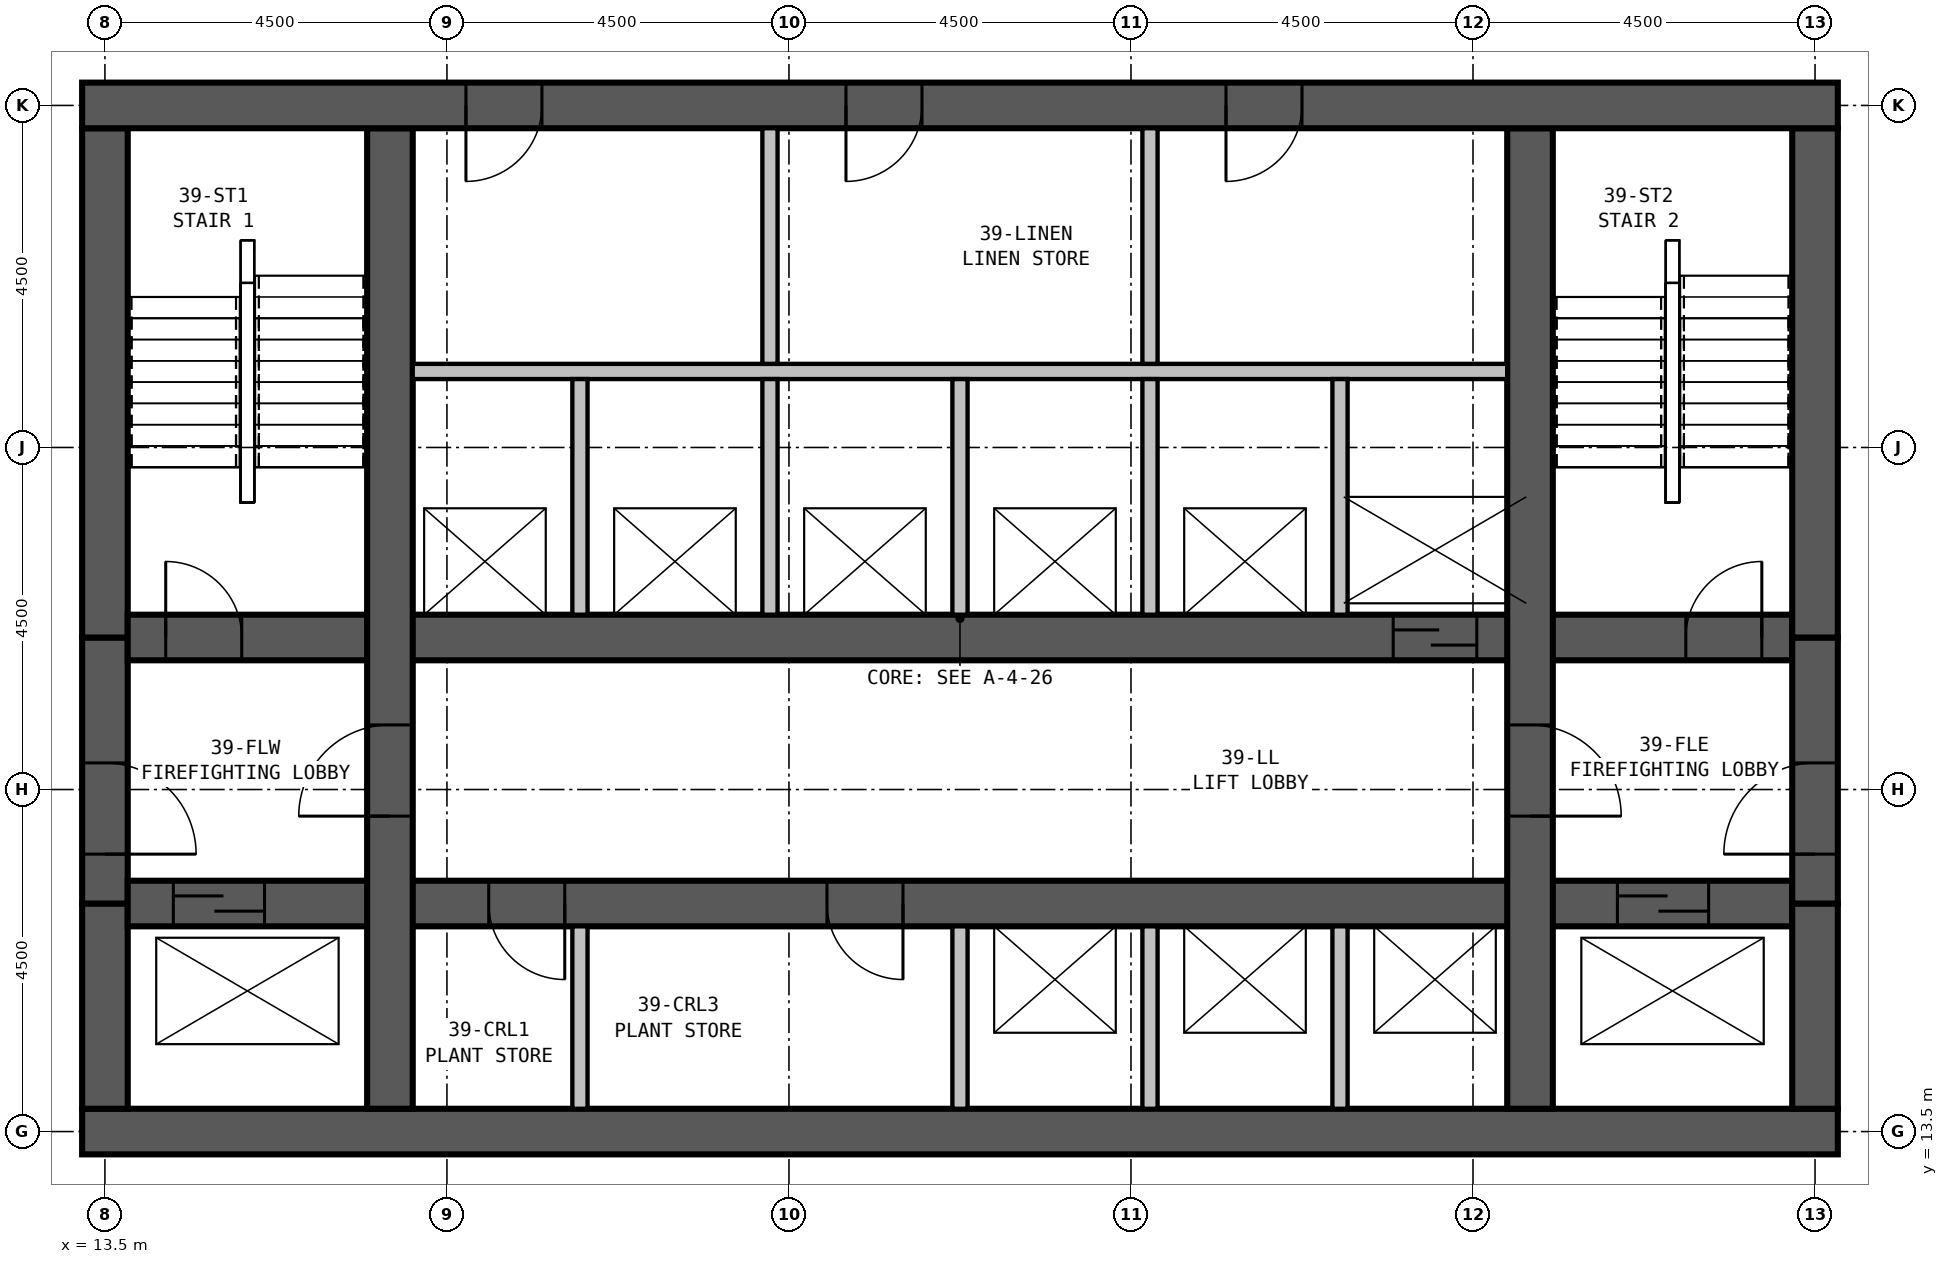
"""IFC4 building model, lengths in metres.
Left out: names, types, materials, properties, quantities, classifications, styles, units other than length and angle.
Written with IfcOpenShell. Run it as: python <this file> out.ifc"""

import sys

from ifc_helpers import new_model, si_unit, direction, frame, frame_2d, origin, place, context, subcontext, project, spatial, rectangle, extrude, element, fill, save


model = new_model("IFC4")
c1 = context("Model", 3, precision=1e-05, world=origin(), true_north=direction((0.0, 1.0)))
c2 = subcontext(c1, "Body", "Model", "MODEL_VIEW")
j1 = project(units=[si_unit("LENGTHUNIT", "METRE"), si_unit("PLANEANGLEUNIT", "RADIAN")], contexts=[c1])
p1 = place(None, origin())
s1 = spatial("IfcSite", under=j1, at=p1, CompositionType="ELEMENT")
p2 = place(p1, origin())
s2 = spatial("IfcBuilding", under=s1, at=p2, CompositionType="ELEMENT")
p3 = place(p2, frame((0.0, 0.0, 151.9)))
s3 = spatial("IfcBuildingStorey", under=s2, at=p3, CompositionType="ELEMENT", Elevation=151.9)
p4 = place(p3, frame((13.2, 13.5, 0.0), z_axis=(0.0, 0.0, 1.0), x_axis=(1.0, 0.0, 0.0)))
e1 = element("IfcWall", 1, at=p4, inside=s3, PredefinedType="SHEAR", context=c2, shape_type="SweptSolid", body=[
    extrude(rectangle(XDim=23.1, YDim=0.6, at=frame_2d((11.55, 0.0))), origin(), (0.0, 0.0, 1.0), 6.0),
])
p5 = place(p3, frame((36.3, 27.0, 0.0), z_axis=(0.0, 0.0, 1.0), x_axis=(-1.0, 0.0, 0.0)))
e2 = element("IfcWall", 2, at=p5, inside=s3, PredefinedType="SHEAR", context=c2, shape_type="SweptSolid", body=[
    extrude(rectangle(XDim=23.1, YDim=0.6, at=frame_2d((11.55, 0.0))), origin(), (0.0, 0.0, 1.0), 6.0),
])
p6 = place(p5, frame((17.05, 0.0, 0.0)))
e3 = element("IfcOpeningElement", 3, at=p6, cuts=e2, PredefinedType="OPENING", context=c2, shape_type="SweptSolid", body=[
    extrude(rectangle(XDim=1.0, YDim=2.1, at=frame_2d((0.5, 1.05))), frame((0.0, 0.31, 0.0), z_axis=(0.0, -1.0, 0.0), x_axis=(1.0, 0.0, 0.0)), (0.0, 0.0, 1.0), 0.62),
])
p7 = place(p5, frame((12.05, 0.0, 0.0)))
e4 = element("IfcOpeningElement", 4, at=p7, cuts=e2, PredefinedType="OPENING", context=c2, shape_type="SweptSolid", body=[
    extrude(rectangle(XDim=1.0, YDim=2.1, at=frame_2d((0.5, 1.05))), frame((0.0, 0.31, 0.0), z_axis=(0.0, -1.0, 0.0), x_axis=(1.0, 0.0, 0.0)), (0.0, 0.0, 1.0), 0.62),
])
p8 = place(p5, frame((7.05, 0.0, 0.0)))
e5 = element("IfcOpeningElement", 5, at=p8, cuts=e2, PredefinedType="OPENING", context=c2, shape_type="SweptSolid", body=[
    extrude(rectangle(XDim=1.0, YDim=2.1, at=frame_2d((0.5, 1.05))), frame((0.0, 0.31, 0.0), z_axis=(0.0, -1.0, 0.0), x_axis=(1.0, 0.0, 0.0)), (0.0, 0.0, 1.0), 0.62),
])
p9 = place(p3, frame((17.25, 13.8, 0.0), z_axis=(0.0, 0.0, 1.0), x_axis=(0.0, 1.0, 0.0)))
e6 = element("IfcWall", 6, at=p9, inside=s3, PredefinedType="SHEAR", context=c2, shape_type="SweptSolid", body=[
    extrude(rectangle(XDim=12.9, YDim=0.6, at=frame_2d((6.45, 0.0))), origin(), (0.0, 0.0, 1.0), 6.0),
])
p10 = place(p9, frame((3.85, 0.0, 0.0)))
e7 = element("IfcOpeningElement", 7, at=p10, cuts=e6, PredefinedType="OPENING", context=c2, shape_type="SweptSolid", body=[
    extrude(rectangle(XDim=1.2, YDim=2.1, at=frame_2d((0.6, 1.05))), frame((0.0, 0.31, 0.0), z_axis=(0.0, -1.0, 0.0), x_axis=(1.0, 0.0, 0.0)), (0.0, 0.0, 1.0), 0.62),
])
p11 = place(p3, frame((32.25, 13.8, 0.0), z_axis=(0.0, 0.0, 1.0), x_axis=(0.0, 1.0, 0.0)))
e8 = element("IfcWall", 8, at=p11, inside=s3, PredefinedType="SHEAR", context=c2, shape_type="SweptSolid", body=[
    extrude(rectangle(XDim=12.9, YDim=0.6, at=frame_2d((6.45, 0.0))), origin(), (0.0, 0.0, 1.0), 6.0),
])
p12 = place(p11, frame((5.05, 0.0, 0.0), z_axis=(0.0, 0.0, 1.0), x_axis=(-1.0, 0.0, 0.0)))
e9 = element("IfcOpeningElement", 9, at=p12, cuts=e8, PredefinedType="OPENING", context=c2, shape_type="SweptSolid", body=[
    extrude(rectangle(XDim=1.2, YDim=2.1, at=frame_2d((0.6, 1.05))), frame((0.0, 0.31, 0.0), z_axis=(0.0, -1.0, 0.0), x_axis=(1.0, 0.0, 0.0)), (0.0, 0.0, 1.0), 0.62),
])
p13 = place(p3, frame((13.8, 16.5, 0.0), z_axis=(0.0, 0.0, 1.0), x_axis=(1.0, 0.0, 0.0)))
e10 = element("IfcWall", 10, at=p13, inside=s3, PredefinedType="SHEAR", context=c2, shape_type="SweptSolid", body=[
    extrude(rectangle(XDim=21.9, YDim=0.6, at=frame_2d((10.95, 0.0))), origin(), (0.0, 0.0, 1.0), 6.0),
])
p14 = place(p13, frame((5.75, 0.0, 0.0), z_axis=(0.0, 0.0, 1.0), x_axis=(-1.0, 0.0, 0.0)))
e11 = element("IfcOpeningElement", 11, at=p14, cuts=e10, PredefinedType="OPENING", context=c2, shape_type="SweptSolid", body=[
    extrude(rectangle(XDim=1.0, YDim=2.1, at=frame_2d((0.5, 1.05))), frame((0.0, 0.31, 0.0), z_axis=(0.0, -1.0, 0.0), x_axis=(1.0, 0.0, 0.0)), (0.0, 0.0, 1.0), 0.62),
])
p15 = place(p13, frame((10.2, 0.0, 0.0), z_axis=(0.0, 0.0, 1.0), x_axis=(-1.0, 0.0, 0.0)))
e12 = element("IfcOpeningElement", 12, at=p15, cuts=e10, PredefinedType="OPENING", context=c2, shape_type="SweptSolid", body=[
    extrude(rectangle(XDim=1.0, YDim=2.1, at=frame_2d((0.5, 1.05))), frame((0.0, 0.31, 0.0), z_axis=(0.0, -1.0, 0.0), x_axis=(1.0, 0.0, 0.0)), (0.0, 0.0, 1.0), 0.62),
])
p16 = place(p13, frame((0.6, 0.0, 0.0)))
e13 = element("IfcOpeningElement", 13, at=p16, cuts=e10, PredefinedType="OPENING", context=c2, shape_type="SweptSolid", body=[
    extrude(rectangle(XDim=1.2, YDim=2.1, at=frame_2d((0.6, 1.05))), frame((0.0, 0.31, 0.0), z_axis=(0.0, -1.0, 0.0), x_axis=(1.0, 0.0, 0.0)), (0.0, 0.0, 1.0), 0.62),
])
p17 = place(p13, frame((19.6, 0.0, 0.0)))
e14 = element("IfcOpeningElement", 14, at=p17, cuts=e10, PredefinedType="OPENING", context=c2, shape_type="SweptSolid", body=[
    extrude(rectangle(XDim=1.2, YDim=2.1, at=frame_2d((0.6, 1.05))), frame((0.0, 0.31, 0.0), z_axis=(0.0, -1.0, 0.0), x_axis=(1.0, 0.0, 0.0)), (0.0, 0.0, 1.0), 0.62),
])
p18 = place(p3, frame((13.8, 20.0, 0.0), z_axis=(0.0, 0.0, 1.0), x_axis=(1.0, 0.0, 0.0)))
e15 = element("IfcWall", 15, at=p18, inside=s3, PredefinedType="SHEAR", context=c2, shape_type="SweptSolid", body=[
    extrude(rectangle(XDim=21.9, YDim=0.6, at=frame_2d((10.95, 0.0))), origin(), (0.0, 0.0, 1.0), 6.0),
])
p19 = place(p18, frame((0.5, 0.0, 0.0)))
e16 = element("IfcOpeningElement", 16, at=p19, cuts=e15, PredefinedType="OPENING", context=c2, shape_type="SweptSolid", body=[
    extrude(rectangle(XDim=1.0, YDim=2.1, at=frame_2d((0.5, 1.05))), frame((0.0, 0.31, 0.0), z_axis=(0.0, -1.0, 0.0), x_axis=(1.0, 0.0, 0.0)), (0.0, 0.0, 1.0), 0.62),
])
p20 = place(p18, frame((20.5, 0.0, 0.0)))
e17 = element("IfcOpeningElement", 17, at=p20, cuts=e15, PredefinedType="OPENING", context=c2, shape_type="SweptSolid", body=[
    extrude(rectangle(XDim=1.0, YDim=2.1, at=frame_2d((0.5, 1.05))), frame((0.0, 0.31, 0.0), z_axis=(0.0, -1.0, 0.0), x_axis=(1.0, 0.0, 0.0)), (0.0, 0.0, 1.0), 0.62),
])
p21 = place(p18, frame((16.65, 0.0, 0.0)))
e18 = element("IfcOpeningElement", 18, at=p21, cuts=e15, PredefinedType="OPENING", context=c2, shape_type="SweptSolid", body=[
    extrude(rectangle(XDim=1.1, YDim=2.1, at=frame_2d((0.55, 1.05))), frame((0.0, 0.31, 0.0), z_axis=(0.0, -1.0, 0.0), x_axis=(1.0, 0.0, 0.0)), (0.0, 0.0, 1.0), 0.62),
])
p22 = place(p3, frame((13.5, 26.7, 0.0), z_axis=(0.0, 0.0, 1.0), x_axis=(0.0, -1.0, 0.0)))
e19 = element("IfcWall", 19, at=p22, inside=s3, PredefinedType="SHEAR", context=c2, shape_type="SweptSolid", body=[
    extrude(rectangle(XDim=6.7, YDim=0.6, at=frame_2d((3.35, 0.0))), origin(), (0.0, 0.0, 1.0), 6.0),
])
p23 = place(p3, frame((13.5, 20.0, 0.0), z_axis=(0.0, 0.0, 1.0), x_axis=(0.0, -1.0, 0.0)))
e20 = element("IfcWall", 20, at=p23, inside=s3, PredefinedType="SHEAR", context=c2, shape_type="SweptSolid", body=[
    extrude(rectangle(XDim=3.5, YDim=0.6, at=frame_2d((1.75, 0.0))), origin(), (0.0, 0.0, 1.0), 6.0),
])
p24 = place(p23, frame((1.65, 0.0, 0.0)))
e21 = element("IfcOpeningElement", 21, at=p24, cuts=e20, PredefinedType="OPENING", context=c2, shape_type="SweptSolid", body=[
    extrude(rectangle(XDim=1.2, YDim=2.1, at=frame_2d((0.6, 1.05))), frame((0.0, 0.31, 0.0), z_axis=(0.0, -1.0, 0.0), x_axis=(1.0, 0.0, 0.0)), (0.0, 0.0, 1.0), 0.62),
])
for number, where, z_axis, x_axis in (
    (22, (13.5, 16.5, 0.0), (0.0, 0.0, 1.0), (0.0, -1.0, 0.0)),
    (23, (36.0, 13.8, 0.0), (0.0, 0.0, 1.0), (0.0, 1.0, 0.0)),
):
    element("IfcWall", number, at=place(p3, frame(where, z_axis=z_axis, x_axis=x_axis)), inside=s3, PredefinedType="SHEAR", context=c2, shape_type="SweptSolid", body=[
        extrude(rectangle(XDim=2.7, YDim=0.6, at=frame_2d((1.35, 0.0))), origin(), (0.0, 0.0, 1.0), 6.0),
    ])
p25 = place(p3, frame((36.0, 16.5, 0.0), z_axis=(0.0, 0.0, 1.0), x_axis=(0.0, 1.0, 0.0)))
e24 = element("IfcWall", 24, at=p25, inside=s3, PredefinedType="SHEAR", context=c2, shape_type="SweptSolid", body=[
    extrude(rectangle(XDim=3.5, YDim=0.6, at=frame_2d((1.75, 0.0))), origin(), (0.0, 0.0, 1.0), 6.0),
])
p26 = place(p25, frame((0.65, 0.0, 0.0)))
e25 = element("IfcOpeningElement", 25, at=p26, cuts=e24, PredefinedType="OPENING", context=c2, shape_type="SweptSolid", body=[
    extrude(rectangle(XDim=1.2, YDim=2.1, at=frame_2d((0.6, 1.05))), frame((0.0, 0.31, 0.0), z_axis=(0.0, -1.0, 0.0), x_axis=(1.0, 0.0, 0.0)), (0.0, 0.0, 1.0), 0.62),
])
p27 = place(p3, frame((36.0, 20.0, 0.0), z_axis=(0.0, 0.0, 1.0), x_axis=(0.0, 1.0, 0.0)))
e26 = element("IfcWall", 26, at=p27, inside=s3, PredefinedType="SHEAR", context=c2, shape_type="SweptSolid", body=[
    extrude(rectangle(XDim=6.7, YDim=0.6, at=frame_2d((3.35, 0.0))), origin(), (0.0, 0.0, 1.0), 6.0),
])
p28 = place(p3, frame((19.75, 13.8, 0.0), z_axis=(0.0, 0.0, 1.0), x_axis=(0.0, 1.0, 0.0)))
e27 = element("IfcWall", 27, at=p28, inside=s3, PredefinedType="PARTITIONING", context=c2, shape_type="SweptSolid", body=[
    extrude(rectangle(XDim=2.4, YDim=0.2, at=frame_2d((1.2, 0.0))), origin(), (0.0, 0.0, 1.0), 5.75),
])
for number, where, z_axis, x_axis in (
    (28, (19.75, 20.3, 0.0), (0.0, 0.0, 1.0), (0.0, 1.0, 0.0)),
    (29, (22.25, 20.3, 0.0), (0.0, 0.0, 1.0), (0.0, 1.0, 0.0)),
):
    element("IfcWall", number, at=place(p3, frame(where, z_axis=z_axis, x_axis=x_axis)), inside=s3, PredefinedType="PARTITIONING", context=c2, shape_type="SweptSolid", body=[
        extrude(rectangle(XDim=3.1, YDim=0.2, at=frame_2d((1.55, 0.0))), origin(), (0.0, 0.0, 1.0), 5.75),
    ])
p29 = place(p3, frame((24.75, 13.8, 0.0), z_axis=(0.0, 0.0, 1.0), x_axis=(0.0, 1.0, 0.0)))
e30 = element("IfcWall", 30, at=p29, inside=s3, PredefinedType="PARTITIONING", context=c2, shape_type="SweptSolid", body=[
    extrude(rectangle(XDim=2.4, YDim=0.2, at=frame_2d((1.2, 0.0))), origin(), (0.0, 0.0, 1.0), 5.75),
])
p30 = place(p3, frame((24.75, 20.3, 0.0), z_axis=(0.0, 0.0, 1.0), x_axis=(0.0, 1.0, 0.0)))
e31 = element("IfcWall", 31, at=p30, inside=s3, PredefinedType="PARTITIONING", context=c2, shape_type="SweptSolid", body=[
    extrude(rectangle(XDim=3.1, YDim=0.2, at=frame_2d((1.55, 0.0))), origin(), (0.0, 0.0, 1.0), 5.75),
])
p31 = place(p3, frame((27.25, 13.8, 0.0), z_axis=(0.0, 0.0, 1.0), x_axis=(0.0, 1.0, 0.0)))
e32 = element("IfcWall", 32, at=p31, inside=s3, PredefinedType="PARTITIONING", context=c2, shape_type="SweptSolid", body=[
    extrude(rectangle(XDim=2.4, YDim=0.2, at=frame_2d((1.2, 0.0))), origin(), (0.0, 0.0, 1.0), 5.75),
])
p32 = place(p3, frame((27.25, 20.3, 0.0), z_axis=(0.0, 0.0, 1.0), x_axis=(0.0, 1.0, 0.0)))
e33 = element("IfcWall", 33, at=p32, inside=s3, PredefinedType="PARTITIONING", context=c2, shape_type="SweptSolid", body=[
    extrude(rectangle(XDim=3.1, YDim=0.2, at=frame_2d((1.55, 0.0))), origin(), (0.0, 0.0, 1.0), 5.75),
])
p33 = place(p3, frame((29.75, 13.8, 0.0), z_axis=(0.0, 0.0, 1.0), x_axis=(0.0, 1.0, 0.0)))
e34 = element("IfcWall", 34, at=p33, inside=s3, PredefinedType="PARTITIONING", context=c2, shape_type="SweptSolid", body=[
    extrude(rectangle(XDim=2.4, YDim=0.2, at=frame_2d((1.2, 0.0))), origin(), (0.0, 0.0, 1.0), 5.75),
])
p34 = place(p3, frame((29.75, 20.3, 0.0), z_axis=(0.0, 0.0, 1.0), x_axis=(0.0, 1.0, 0.0)))
e35 = element("IfcWall", 35, at=p34, inside=s3, PredefinedType="PARTITIONING", context=c2, shape_type="SweptSolid", body=[
    extrude(rectangle(XDim=3.1, YDim=0.2, at=frame_2d((1.55, 0.0))), origin(), (0.0, 0.0, 1.0), 5.75),
])
p35 = place(p3, frame((17.55, 23.5, 0.0), z_axis=(0.0, 0.0, 1.0), x_axis=(1.0, 0.0, 0.0)))
e36 = element("IfcWall", 36, at=p35, inside=s3, PredefinedType="PARTITIONING", context=c2, shape_type="SweptSolid", body=[
    extrude(rectangle(XDim=14.4, YDim=0.2, at=frame_2d((7.2, 0.0))), origin(), (0.0, 0.0, 1.0), 5.75),
])
for number, where, z_axis, x_axis in (
    (37, (22.25, 23.6, 0.0), (0.0, 0.0, 1.0), (0.0, 1.0, 0.0)),
    (38, (27.25, 23.6, 0.0), (0.0, 0.0, 1.0), (0.0, 1.0, 0.0)),
):
    element("IfcWall", number, at=place(p3, frame(where, z_axis=z_axis, x_axis=x_axis)), inside=s3, PredefinedType="PARTITIONING", context=c2, shape_type="SweptSolid", body=[
        extrude(rectangle(XDim=3.1, YDim=0.2, at=frame_2d((1.55, 0.0))), origin(), (0.0, 0.0, 1.0), 5.75),
    ])
p36 = place(p24, origin())
e39 = element("IfcDoor", 39, at=p36, inside=s3, OperationType="SINGLE_SWING_RIGHT", PredefinedType="DOOR", context=c2, shape_type="SweptSolid", body=[
    extrude(rectangle(XDim=1.2, YDim=2.1, at=frame_2d((0.6, 1.05))), frame((0.0, 0.3, 0.0), z_axis=(0.0, -1.0, 0.0), x_axis=(1.0, 0.0, 0.0)), (0.0, 0.0, 1.0), 0.6),
])
fill(e21, e39)
p37 = place(p26, origin())
e40 = element("IfcDoor", 40, at=p37, inside=s3, OperationType="SINGLE_SWING_LEFT", PredefinedType="DOOR", context=c2, shape_type="SweptSolid", body=[
    extrude(rectangle(XDim=1.2, YDim=2.1, at=frame_2d((0.6, 1.05))), frame((0.0, 0.3, 0.0), z_axis=(0.0, -1.0, 0.0), x_axis=(1.0, 0.0, 0.0)), (0.0, 0.0, 1.0), 0.6),
])
fill(e25, e40)
p38 = place(p10, origin())
e41 = element("IfcDoor", 41, at=p38, inside=s3, OperationType="SINGLE_SWING_LEFT", PredefinedType="DOOR", context=c2, shape_type="SweptSolid", body=[
    extrude(rectangle(XDim=1.2, YDim=2.1, at=frame_2d((0.6, 1.05))), frame((0.0, 0.3, 0.0), z_axis=(0.0, -1.0, 0.0), x_axis=(1.0, 0.0, 0.0)), (0.0, 0.0, 1.0), 0.6),
])
fill(e7, e41)
p39 = place(p12, origin())
e42 = element("IfcDoor", 42, at=p39, inside=s3, OperationType="SINGLE_SWING_RIGHT", PredefinedType="DOOR", context=c2, shape_type="SweptSolid", body=[
    extrude(rectangle(XDim=1.2, YDim=2.1, at=frame_2d((0.6, 1.05))), frame((0.0, 0.3, 0.0), z_axis=(0.0, -1.0, 0.0), x_axis=(1.0, 0.0, 0.0)), (0.0, 0.0, 1.0), 0.6),
])
fill(e9, e42)
p40 = place(p19, origin())
e43 = element("IfcDoor", 43, at=p40, inside=s3, OperationType="SINGLE_SWING_LEFT", PredefinedType="DOOR", context=c2, shape_type="SweptSolid", body=[
    extrude(rectangle(XDim=1.0, YDim=2.1, at=frame_2d((0.5, 1.05))), frame((0.0, 0.3, 0.0), z_axis=(0.0, -1.0, 0.0), x_axis=(1.0, 0.0, 0.0)), (0.0, 0.0, 1.0), 0.6),
])
fill(e16, e43)
p41 = place(p20, origin())
e44 = element("IfcDoor", 44, at=p41, inside=s3, OperationType="SINGLE_SWING_RIGHT", PredefinedType="DOOR", context=c2, shape_type="SweptSolid", body=[
    extrude(rectangle(XDim=1.0, YDim=2.1, at=frame_2d((0.5, 1.05))), frame((0.0, 0.3, 0.0), z_axis=(0.0, -1.0, 0.0), x_axis=(1.0, 0.0, 0.0)), (0.0, 0.0, 1.0), 0.6),
])
fill(e17, e44)
p42 = place(p21, origin())
e45 = element("IfcDoor", 45, at=p42, inside=s3, OperationType="SLIDING_TO_LEFT", PredefinedType="DOOR", context=c2, shape_type="SweptSolid", body=[
    extrude(rectangle(XDim=1.1, YDim=2.1, at=frame_2d((0.55, 1.05))), frame((0.0, 0.3, 0.0), z_axis=(0.0, -1.0, 0.0), x_axis=(1.0, 0.0, 0.0)), (0.0, 0.0, 1.0), 0.6),
])
fill(e18, e45)
p43 = place(p14, origin())
e46 = element("IfcDoor", 46, at=p43, inside=s3, OperationType="SINGLE_SWING_LEFT", PredefinedType="DOOR", context=c2, shape_type="SweptSolid", body=[
    extrude(rectangle(XDim=1.0, YDim=2.1, at=frame_2d((0.5, 1.05))), frame((0.0, 0.3, 0.0), z_axis=(0.0, -1.0, 0.0), x_axis=(1.0, 0.0, 0.0)), (0.0, 0.0, 1.0), 0.6),
])
fill(e11, e46)
p44 = place(p15, origin())
e47 = element("IfcDoor", 47, at=p44, inside=s3, OperationType="SINGLE_SWING_LEFT", PredefinedType="DOOR", context=c2, shape_type="SweptSolid", body=[
    extrude(rectangle(XDim=1.0, YDim=2.1, at=frame_2d((0.5, 1.05))), frame((0.0, 0.3, 0.0), z_axis=(0.0, -1.0, 0.0), x_axis=(1.0, 0.0, 0.0)), (0.0, 0.0, 1.0), 0.6),
])
fill(e12, e47)
p45 = place(p16, origin())
e48 = element("IfcDoor", 48, at=p45, inside=s3, OperationType="SLIDING_TO_LEFT", PredefinedType="DOOR", context=c2, shape_type="SweptSolid", body=[
    extrude(rectangle(XDim=1.2, YDim=2.1, at=frame_2d((0.6, 1.05))), frame((0.0, 0.3, 0.0), z_axis=(0.0, -1.0, 0.0), x_axis=(1.0, 0.0, 0.0)), (0.0, 0.0, 1.0), 0.6),
])
fill(e13, e48)
p46 = place(p17, origin())
e49 = element("IfcDoor", 49, at=p46, inside=s3, OperationType="SLIDING_TO_LEFT", PredefinedType="DOOR", context=c2, shape_type="SweptSolid", body=[
    extrude(rectangle(XDim=1.2, YDim=2.1, at=frame_2d((0.6, 1.05))), frame((0.0, 0.3, 0.0), z_axis=(0.0, -1.0, 0.0), x_axis=(1.0, 0.0, 0.0)), (0.0, 0.0, 1.0), 0.6),
])
fill(e14, e49)
p47 = place(p6, origin())
e50 = element("IfcDoor", 50, at=p47, inside=s3, OperationType="SINGLE_SWING_RIGHT", PredefinedType="DOOR", context=c2, shape_type="SweptSolid", body=[
    extrude(rectangle(XDim=1.0, YDim=2.1, at=frame_2d((0.5, 1.05))), frame((0.0, 0.3, 0.0), z_axis=(0.0, -1.0, 0.0), x_axis=(1.0, 0.0, 0.0)), (0.0, 0.0, 1.0), 0.6),
])
fill(e3, e50)
p48 = place(p7, origin())
e51 = element("IfcDoor", 51, at=p48, inside=s3, OperationType="SINGLE_SWING_RIGHT", PredefinedType="DOOR", context=c2, shape_type="SweptSolid", body=[
    extrude(rectangle(XDim=1.0, YDim=2.1, at=frame_2d((0.5, 1.05))), frame((0.0, 0.3, 0.0), z_axis=(0.0, -1.0, 0.0), x_axis=(1.0, 0.0, 0.0)), (0.0, 0.0, 1.0), 0.6),
])
fill(e4, e51)
p49 = place(p8, origin())
e52 = element("IfcDoor", 52, at=p49, inside=s3, OperationType="SINGLE_SWING_RIGHT", PredefinedType="DOOR", context=c2, shape_type="SweptSolid", body=[
    extrude(rectangle(XDim=1.0, YDim=2.1, at=frame_2d((0.5, 1.05))), frame((0.0, 0.3, 0.0), z_axis=(0.0, -1.0, 0.0), x_axis=(1.0, 0.0, 0.0)), (0.0, 0.0, 1.0), 0.6),
])
fill(e5, e52)
save(model, sys.argv[1])
